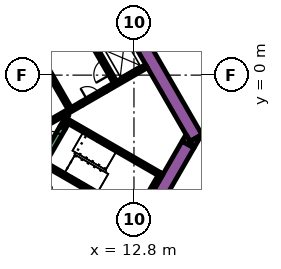
"""IFC4 building model, lengths in metres.
Left out: names, types, materials, properties, quantities, classifications, styles, units other than length and angle.
Written with IfcOpenShell. Run it as: python <this file> out.ifc"""

import sys

from ifc_helpers import new_model, si_unit, direction, frame, frame_2d, origin, place, context, subcontext, project, spatial, polyline, rectangle, outline, extrude, element, fill, save


model = new_model("IFC4")
c1 = context("Model", 3, precision=1e-05, world=origin(), true_north=direction((0.0, 1.0)))
c2 = subcontext(c1, "Body", "Model", "MODEL_VIEW")
j1 = project(units=[si_unit("LENGTHUNIT", "METRE"), si_unit("PLANEANGLEUNIT", "RADIAN")], contexts=[c1])
p1 = place(None, origin())
s1 = spatial("IfcSite", under=j1, at=p1, CompositionType="ELEMENT")
p2 = place(p1, origin())
s2 = spatial("IfcBuilding", under=s1, at=p2, CompositionType="ELEMENT")
p3 = place(p2, origin())
s3 = spatial("IfcBuildingStorey", under=s2, at=p3, CompositionType="ELEMENT", Elevation=0.0)
p4 = place(p3, frame((6.776, 13.364, -1.8), z_axis=(0.0, 0.0, 1.0), x_axis=(0.500004177138, -0.8660229921, 0.0)))
e1 = element("IfcWall", 1, at=p4, inside=s3, PredefinedType="SOLIDWALL", context=c2, shape_type="SweptSolid", body=[
    extrude(rectangle(XDim=20.204, YDim=0.9, at=frame_2d((10.102, 0.0))), origin(), (0.0, 0.0, 1.0), 7.8),
])
p5 = place(p3, frame((0.0, 0.0, -1.8)))
e2 = element("IfcWall", 2, at=p5, inside=s3, PredefinedType="SOLIDWALL", context=c2, shape_type="SweptSolid", body=[
    extrude(outline(polyline([(16.743, -4.8), (16.489, -4.36), (17.251, -3.92), (16.743, -4.8)])), origin(), (0.0, 0.0, 1.0), 7.8),
])
p6 = place(p3, frame((11.695, -12.644, -1.8), z_axis=(0.0, 0.0, 1.0), x_axis=(0.500010229568, 0.86601949766, 0.0)))
e3 = element("IfcWall", 3, at=p6, inside=s3, PredefinedType="SOLIDWALL", context=c2, shape_type="SweptSolid", body=[
    extrude(rectangle(XDim=9.326, YDim=0.9, at=frame_2d((4.663, 0.0))), origin(), (0.0, 0.0, 1.0), 7.8),
])
e4 = element("IfcWall", 4, at=p5, inside=s3, PredefinedType="SOLIDWALL", context=c2, shape_type="SweptSolid", body=[
    extrude(outline(polyline([(16.223, -3.9), (16.732, -4.78), (15.969, -4.34), (16.223, -3.9)])), origin(), (0.0, 0.0, 1.0), 7.8),
])
p7 = place(p3, frame((12.885, -9.431, 0.0), z_axis=(0.0, 0.0, 1.0), x_axis=(0.500020560727, 0.866013532718, 0.0)))
e5 = element("IfcWall", 5, at=p7, inside=s3, PredefinedType="SOLIDWALL", context=c2, shape_type="SweptSolid", body=[
    extrude(rectangle(XDim=3.45, YDim=0.25, at=frame_2d((1.725, 0.0))), origin(), (0.0, 0.0, 1.0), 6.0),
])
p8 = place(p3, frame((12.84, -9.261, 0.0), z_axis=(0.0, 0.0, 1.0), x_axis=(-0.866013990052, 0.500019768644, 0.0)))
e6 = element("IfcWall", 6, at=p8, inside=s3, PredefinedType="SOLIDWALL", context=c2, shape_type="SweptSolid", body=[
    extrude(rectangle(XDim=6.8, YDim=0.25, at=frame_2d((3.4, 0.0))), origin(), (0.0, 0.0, 1.0), 6.0),
])
p9 = place(p3, frame((8.334, -2.964, 0.0), z_axis=(0.0, 0.0, 1.0), x_axis=(0.866016039709, -0.500016218704, 0.0)))
e7 = element("IfcWall", 7, at=p9, inside=s3, PredefinedType="SOLIDWALL", context=c2, shape_type="SweptSolid", body=[
    extrude(rectangle(XDim=7.05, YDim=0.25, at=frame_2d((3.525, 0.0))), origin(), (0.0, 0.0, 1.0), 6.0),
])
p10 = place(p3, frame((8.168, -3.503, 0.0), z_axis=(0.0, 0.0, 1.0), x_axis=(0.49972245349, 0.866185586049, 0.0)))
e8 = element("IfcWall", 8, at=p10, inside=s3, PredefinedType="SOLIDWALL", context=c2, shape_type="SweptSolid", body=[
    extrude(rectangle(XDim=0.425, YDim=0.25, at=frame_2d((0.212, 0.0))), origin(), (0.0, 0.0, 1.0), 6.0),
])
p11 = place(p3, frame((13.629, 0.594, -1.8), z_axis=(0.0, 0.0, 1.0), x_axis=(-0.86602790099, -0.499995674689, 0.0)))
e9 = element("IfcWall", 9, at=p11, inside=s3, PredefinedType="SOLIDWALL", context=c2, shape_type="SweptSolid", body=[
    extrude(rectangle(XDim=3.146, YDim=0.25, at=frame_2d((1.573, 0.0))), origin(), (0.0, 0.0, 1.0), 7.8),
])
p12 = place(p3, frame((6.614, -3.456, -1.8), z_axis=(0.0, 0.0, 1.0), x_axis=(0.86602447079, 0.500001615989, 0.0)))
e10 = element("IfcWall", 10, at=p12, inside=s3, PredefinedType="SOLIDWALL", context=c2, shape_type="SweptSolid", body=[
    extrude(rectangle(XDim=3.154, YDim=0.25, at=frame_2d((1.577, 0.0))), origin(), (0.0, 0.0, 1.0), 7.8),
])
p13 = place(p3, frame((8.459, -2.599, -1.8), z_axis=(0.0, 0.0, 1.0), x_axis=(-0.500041054325, -0.866001699761, 0.0)))
e11 = element("IfcWall", 11, at=p13, inside=s3, PredefinedType="PARTITIONING", context=c2, shape_type="SweptSolid", body=[
    extrude(rectangle(XDim=0.929, YDim=0.15, at=frame_2d((0.464, 0.0))), origin(), (0.0, 0.0, 1.0), 7.8),
])
p14 = place(p3, frame((11.553, -0.46, -1.8), z_axis=(0.0, 0.0, 1.0), x_axis=(-0.500006514828, 0.866021642414, 0.0)))
e12 = element("IfcWall", 12, at=p14, inside=s3, PredefinedType="SOLIDWALL", context=c2, shape_type="SweptSolid", body=[
    extrude(rectangle(XDim=12.35, YDim=0.25, at=frame_2d((6.175, 0.0))), origin(), (0.0, 0.0, 1.0), 7.8),
])
p15 = place(p14, frame((0.585, 0.0, 1.8)))
e13 = element("IfcOpeningElement", 13, at=p15, cuts=e12, PredefinedType="OPENING", context=c2, shape_type="SweptSolid", body=[
    extrude(rectangle(XDim=1.1, YDim=2.1, at=frame_2d((0.55, 1.05))), frame((0.0, 0.135, 0.0), z_axis=(0.0, -1.0, 0.0), x_axis=(1.0, 0.0, 0.0)), (0.0, 0.0, 1.0), 0.27),
])
p16 = place(p14, frame((3.105, 0.0, 1.8)))
e14 = element("IfcOpeningElement", 14, at=p16, cuts=e12, PredefinedType="OPENING", context=c2, shape_type="SweptSolid", body=[
    extrude(rectangle(XDim=1.1, YDim=2.1, at=frame_2d((0.55, 1.05))), frame((0.0, 0.135, 0.0), z_axis=(0.0, -1.0, 0.0), x_axis=(1.0, 0.0, 0.0)), (0.0, 0.0, 1.0), 0.27),
])
p17 = place(p14, frame((5.625, 0.0, 1.8)))
e15 = element("IfcOpeningElement", 15, at=p17, cuts=e12, PredefinedType="OPENING", context=c2, shape_type="SweptSolid", body=[
    extrude(rectangle(XDim=1.1, YDim=2.1, at=frame_2d((0.55, 1.05))), frame((0.0, 0.135, 0.0), z_axis=(0.0, -1.0, 0.0), x_axis=(1.0, 0.0, 0.0)), (0.0, 0.0, 1.0), 0.27),
])
p18 = place(p14, frame((8.145, 0.0, 1.8)))
e16 = element("IfcOpeningElement", 16, at=p18, cuts=e12, PredefinedType="OPENING", context=c2, shape_type="SweptSolid", body=[
    extrude(rectangle(XDim=1.1, YDim=2.1, at=frame_2d((0.55, 1.05))), frame((0.0, 0.135, 0.0), z_axis=(0.0, -1.0, 0.0), x_axis=(1.0, 0.0, 0.0)), (0.0, 0.0, 1.0), 0.27),
])
p19 = place(p14, frame((10.665, 0.0, 1.8)))
e17 = element("IfcOpeningElement", 17, at=p19, cuts=e12, PredefinedType="OPENING", context=c2, shape_type="SweptSolid", body=[
    extrude(rectangle(XDim=1.1, YDim=2.1, at=frame_2d((0.55, 1.05))), frame((0.0, 0.135, 0.0), z_axis=(0.0, -1.0, 0.0), x_axis=(1.0, 0.0, 0.0)), (0.0, 0.0, 1.0), 0.27),
])
p20 = place(p3, frame((8.565, -2.185, -1.8), z_axis=(0.0, 0.0, 1.0), x_axis=(-0.499997954832, 0.866026584559, 0.0)))
e18 = element("IfcWall", 18, at=p20, inside=s3, PredefinedType="SOLIDWALL", context=c2, shape_type="SweptSolid", body=[
    extrude(rectangle(XDim=12.35, YDim=0.25, at=frame_2d((6.175, 0.0))), origin(), (0.0, 0.0, 1.0), 7.8),
])
p21 = place(p20, frame((5.725, 0.0, 1.8)))
e19 = element("IfcOpeningElement", 19, at=p21, cuts=e18, PredefinedType="OPENING", context=c2, shape_type="SweptSolid", body=[
    extrude(rectangle(XDim=0.9, YDim=2.1, at=frame_2d((0.45, 1.05))), frame((0.0, 0.135, 0.0), z_axis=(0.0, -1.0, 0.0), x_axis=(1.0, 0.0, 0.0)), (0.0, 0.0, 1.0), 0.27),
])
p22 = place(p3, frame((7.053, -5.284, 0.0), z_axis=(0.0, 0.0, 1.0), x_axis=(0.500078061341, 0.865980330357, 0.0)))
e20 = element("IfcWall", 20, at=p22, inside=s3, PredefinedType="SOLIDWALL", context=c2, shape_type="SweptSolid", body=[
    extrude(rectangle(XDim=2.1, YDim=0.4, at=frame_2d((1.05, 0.0))), origin(), (0.0, 0.0, 1.0), 6.0),
])
p23 = place(p22, frame((0.45, 0.0, 0.0)))
e21 = element("IfcOpeningElement", 21, at=p23, cuts=e20, PredefinedType="OPENING", context=c2, shape_type="SweptSolid", body=[
    extrude(rectangle(XDim=1.2, YDim=2.1, at=frame_2d((0.6, 1.05))), frame((0.0, 0.21, 0.0), z_axis=(0.0, -1.0, 0.0), x_axis=(1.0, 0.0, 0.0)), (0.0, 0.0, 1.0), 0.42),
])
p24 = place(p3, frame((9.346, -1.879, -1.8), z_axis=(0.0, 0.0, 1.0), x_axis=(0.866047807691, 0.499961193289, 0.0)))
e22 = element("IfcWall", 22, at=p24, inside=s3, PredefinedType="SOLIDWALL", context=c2, shape_type="SweptSolid", body=[
    extrude(rectangle(XDim=1.8, YDim=0.25, at=frame_2d((0.9, 0.0))), origin(), (0.0, 0.0, 1.0), 7.8),
])
p25 = place(p24, frame((0.45, 0.0, 1.8)))
e23 = element("IfcOpeningElement", 23, at=p25, cuts=e22, PredefinedType="OPENING", context=c2, shape_type="SweptSolid", body=[
    extrude(rectangle(XDim=0.9, YDim=2.1, at=frame_2d((0.45, 1.05))), frame((0.0, 0.135, 0.0), z_axis=(0.0, -1.0, 0.0), x_axis=(1.0, 0.0, 0.0)), (0.0, 0.0, 1.0), 0.27),
])
p26 = place(p15, origin())
e24 = element("IfcDoor", 24, at=p26, inside=s3, OperationType="DOUBLE_DOOR_SLIDING", PredefinedType="DOOR", context=c2, shape_type="SweptSolid", body=[
    extrude(rectangle(XDim=1.1, YDim=2.1, at=frame_2d((0.55, 1.05))), frame((0.0, 0.025, 0.0), z_axis=(0.0, -1.0, 0.0), x_axis=(1.0, 0.0, 0.0)), (0.0, 0.0, 1.0), 0.05),
])
fill(e13, e24)
p27 = place(p23, origin())
e25 = element("IfcDoor", 25, at=p27, inside=s3, OperationType="SINGLE_SWING_LEFT", PredefinedType="DOOR", context=c2, shape_type="SweptSolid", body=[
    extrude(rectangle(XDim=1.2, YDim=2.1, at=frame_2d((0.6, 1.05))), frame((0.0, 0.025, 0.0), z_axis=(0.0, -1.0, 0.0), x_axis=(1.0, 0.0, 0.0)), (0.0, 0.0, 1.0), 0.05),
])
fill(e21, e25)
p28 = place(p25, origin())
e26 = element("IfcDoor", 26, at=p28, inside=s3, OperationType="SINGLE_SWING_LEFT", PredefinedType="DOOR", context=c2, shape_type="SweptSolid", body=[
    extrude(rectangle(XDim=0.9, YDim=2.1, at=frame_2d((0.45, 1.05))), frame((0.0, 0.025, 0.0), z_axis=(0.0, -1.0, 0.0), x_axis=(1.0, 0.0, 0.0)), (0.0, 0.0, 1.0), 0.05),
])
fill(e23, e26)
save(model, sys.argv[1])
